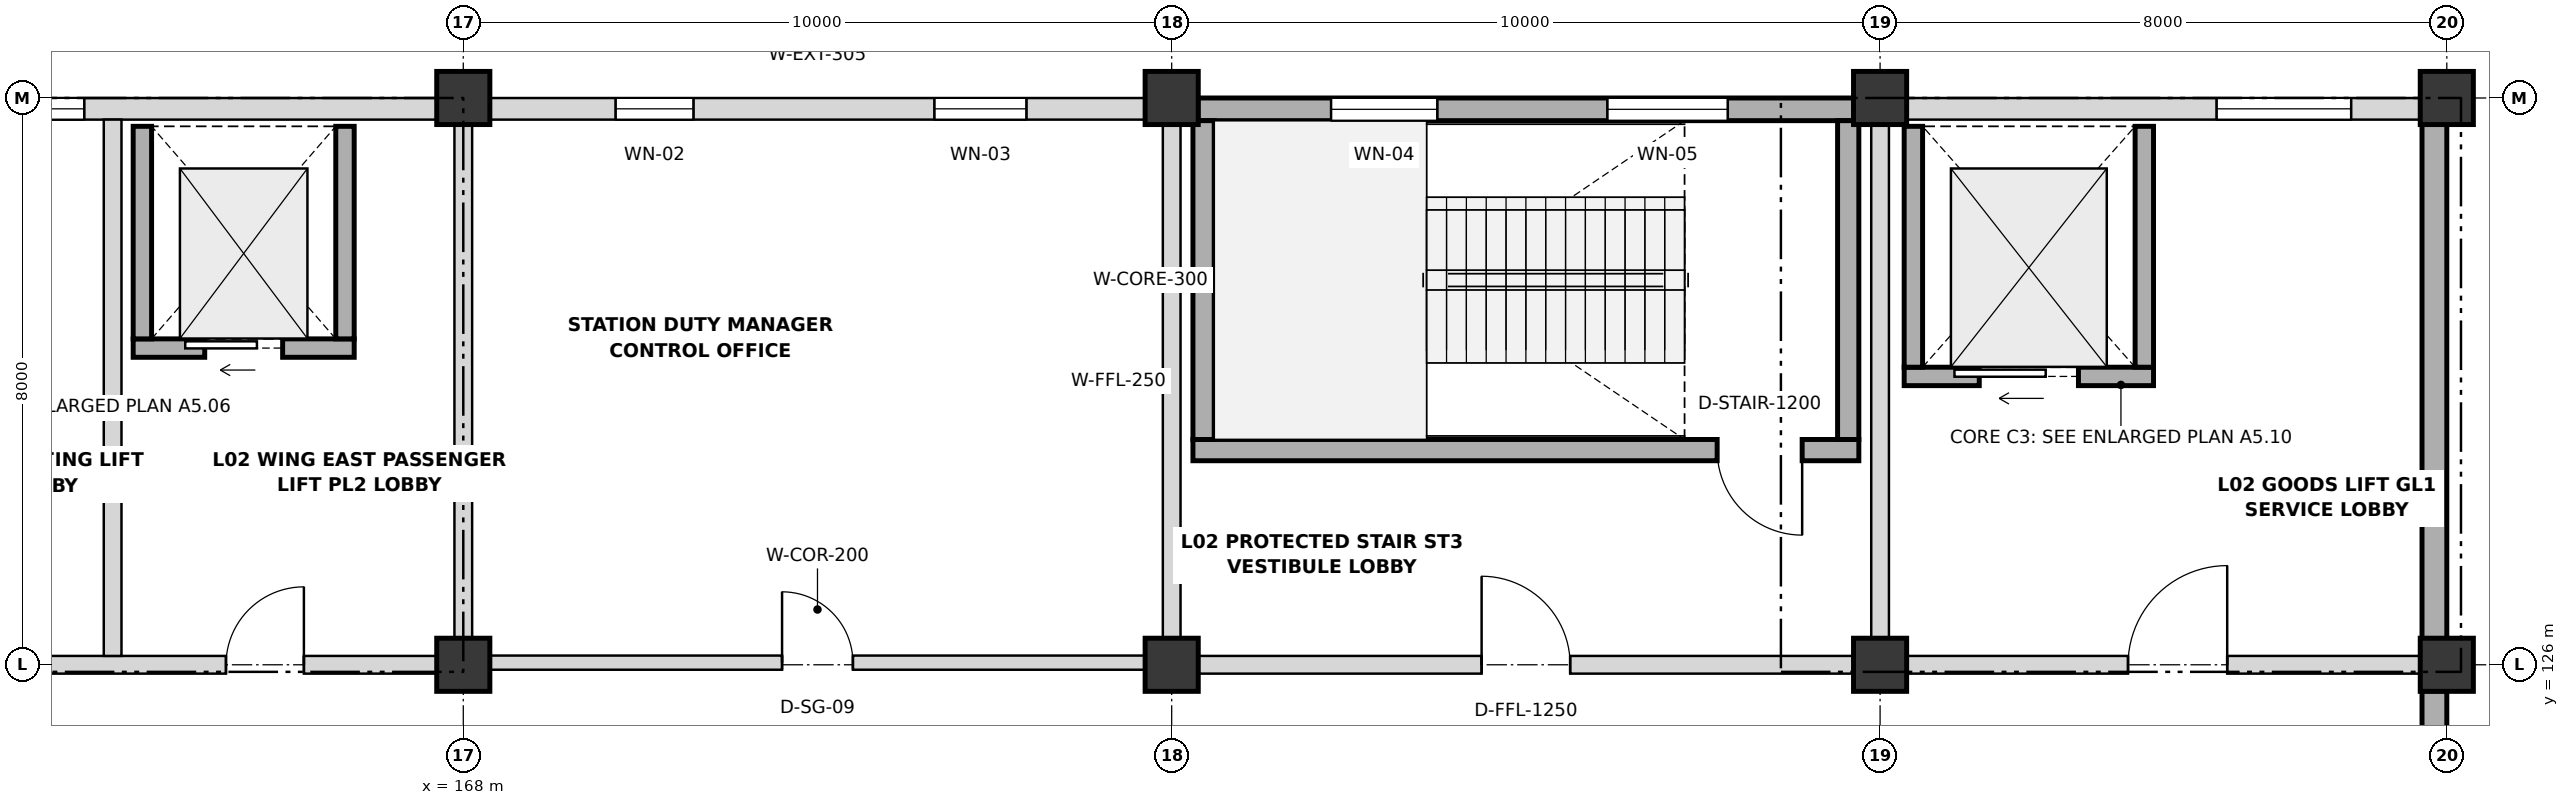
"""IFC4 building model, lengths in metres.
Left out: names, types, materials, properties, quantities, classifications, styles, units other than length and angle.
Written with IfcOpenShell. Run it as: python <this file> out.ifc"""

import sys

from ifc_helpers import new_model, si_unit, direction, frame, frame_2d, origin, origin_2d, place, context, subcontext, project, spatial, rectangle, extrude, element, fill, save


model = new_model("IFC4")
c1 = context("Model", 3, precision=1e-05, world=origin(), true_north=direction((0.0, 1.0)))
c2 = subcontext(c1, "Body", "Model", "MODEL_VIEW")
j1 = project(units=[si_unit("LENGTHUNIT", "METRE"), si_unit("PLANEANGLEUNIT", "RADIAN")], contexts=[c1])
p1 = place(None, origin())
s1 = spatial("IfcSite", under=j1, at=p1, CompositionType="ELEMENT")
p2 = place(p1, origin())
s2 = spatial("IfcBuilding", under=s1, at=p2, CompositionType="ELEMENT")
p3 = place(p2, frame((0.0, 0.0, 9.6)))
s3 = spatial("IfcBuildingStorey", under=s2, at=p3, CompositionType="ELEMENT", Elevation=9.6)
for number, where, z_axis, x_axis in (
    (1, (168.0, 126.0, 0.0), (0.0, 0.0, 1.0), (1.0, 0.0, 0.0)),
    (2, (168.0, 134.0, 0.0), (0.0, 0.0, 1.0), (1.0, 0.0, 0.0)),
    (3, (178.0, 126.0, 0.0), (0.0, 0.0, 1.0), (1.0, 0.0, 0.0)),
    (4, (178.0, 134.0, 0.0), (0.0, 0.0, 1.0), (1.0, 0.0, 0.0)),
    (5, (188.0, 126.0, 0.0), (0.0, 0.0, 1.0), (1.0, 0.0, 0.0)),
    (6, (188.0, 134.0, 0.0), (0.0, 0.0, 1.0), (1.0, 0.0, 0.0)),
    (7, (196.0, 126.0, 0.0), (0.0, 0.0, 1.0), (1.0, 0.0, 0.0)),
    (8, (196.0, 134.0, 0.0), (0.0, 0.0, 1.0), (1.0, 0.0, 0.0)),
):
    element("IfcColumn", number, at=place(p3, frame(where, z_axis=z_axis, x_axis=x_axis)), inside=s3, PredefinedType="COLUMN", context=c2, shape_type="SweptSolid", body=[
        extrude(rectangle(XDim=0.75, YDim=0.75, at=origin_2d()), origin(), (0.0, 0.0, 1.0), 4.8),
    ])
p4 = place(p3, frame((195.825, 125.63, 0.0), z_axis=(0.0, 0.0, 1.0), x_axis=(0.0, -1.0, 0.0)))
e9 = element("IfcWall", 9, at=p4, inside=s3, PredefinedType="SOLIDWALL", context=c2, shape_type="SweptSolid", body=[
    extrude(rectangle(XDim=11.26, YDim=0.35, at=frame_2d((5.63, 0.0))), origin(), (0.0, 0.0, 1.0), 4.8),
])
p5 = place(p3, frame((195.825, 133.63, 0.0), z_axis=(0.0, 0.0, 1.0), x_axis=(0.0, -1.0, 0.0)))
e10 = element("IfcWall", 10, at=p5, inside=s3, PredefinedType="SOLIDWALL", context=c2, shape_type="SweptSolid", body=[
    extrude(rectangle(XDim=7.26, YDim=0.35, at=frame_2d((3.63, 0.0))), origin(), (0.0, 0.0, 1.0), 4.8),
])
p6 = place(p3, frame((158.37, 133.847, 0.0), z_axis=(0.0, 0.0, 1.0), x_axis=(1.0, 0.0, 0.0)))
e11 = element("IfcWall", 11, at=p6, inside=s3, PredefinedType="SOLIDWALL", context=c2, shape_type="SweptSolid", body=[
    extrude(rectangle(XDim=9.26, YDim=0.305, at=frame_2d((4.63, 0.0))), origin(), (0.0, 0.0, 1.0), 3.758),
])
p7 = place(p6, frame((3.38, 0.0, 1.05)))
e12 = element("IfcOpeningElement", 12, at=p7, cuts=e11, PredefinedType="OPENING", context=c2, shape_type="SweptSolid", body=[
    extrude(rectangle(XDim=0.9, YDim=1.15, at=frame_2d((0.45, 0.575))), frame((0.0, 0.162, 0.0), z_axis=(0.0, -1.0, 0.0), x_axis=(1.0, 0.0, 0.0)), (0.0, 0.0, 1.0), 0.325),
])
p8 = place(p3, frame((168.37, 133.847, 0.0), z_axis=(0.0, 0.0, 1.0), x_axis=(1.0, 0.0, 0.0)))
e13 = element("IfcWall", 13, at=p8, inside=s3, PredefinedType="SOLIDWALL", context=c2, shape_type="SweptSolid", body=[
    extrude(rectangle(XDim=9.26, YDim=0.305, at=frame_2d((4.63, 0.0))), origin(), (0.0, 0.0, 1.0), 3.758),
])
p9 = place(p8, frame((1.78, 0.0, 1.05)))
e14 = element("IfcOpeningElement", 14, at=p9, cuts=e13, PredefinedType="OPENING", context=c2, shape_type="SweptSolid", body=[
    extrude(rectangle(XDim=1.1, YDim=1.15, at=frame_2d((0.55, 0.575))), frame((0.0, 0.162, 0.0), z_axis=(0.0, -1.0, 0.0), x_axis=(1.0, 0.0, 0.0)), (0.0, 0.0, 1.0), 0.325),
])
p10 = place(p8, frame((6.28, 0.0, 1.05)))
e15 = element("IfcOpeningElement", 15, at=p10, cuts=e13, PredefinedType="OPENING", context=c2, shape_type="SweptSolid", body=[
    extrude(rectangle(XDim=1.3, YDim=1.15, at=frame_2d((0.65, 0.575))), frame((0.0, 0.162, 0.0), z_axis=(0.0, -1.0, 0.0), x_axis=(1.0, 0.0, 0.0)), (0.0, 0.0, 1.0), 0.325),
])
p11 = place(p3, frame((178.37, 133.84, 0.0), z_axis=(0.0, 0.0, 1.0), x_axis=(1.0, 0.0, 0.0)))
e16 = element("IfcWall", 16, at=p11, inside=s3, PredefinedType="SHEAR", context=c2, shape_type="SweptSolid", body=[
    extrude(rectangle(XDim=9.26, YDim=0.32, at=frame_2d((4.63, 0.0))), origin(), (0.0, 0.0, 1.0), 4.8),
])
p12 = place(p11, frame((1.88, 0.0, 1.05)))
e17 = element("IfcOpeningElement", 17, at=p12, cuts=e16, PredefinedType="OPENING", context=c2, shape_type="SweptSolid", body=[
    extrude(rectangle(XDim=1.5, YDim=1.15, at=frame_2d((0.75, 0.575))), frame((0.0, 0.17, 0.0), z_axis=(0.0, -1.0, 0.0), x_axis=(1.0, 0.0, 0.0)), (0.0, 0.0, 1.0), 0.34),
])
p13 = place(p11, frame((5.78, 0.0, 1.05)))
e18 = element("IfcOpeningElement", 18, at=p13, cuts=e16, PredefinedType="OPENING", context=c2, shape_type="SweptSolid", body=[
    extrude(rectangle(XDim=1.7, YDim=1.15, at=frame_2d((0.85, 0.575))), frame((0.0, 0.17, 0.0), z_axis=(0.0, -1.0, 0.0), x_axis=(1.0, 0.0, 0.0)), (0.0, 0.0, 1.0), 0.34),
])
p14 = place(p3, frame((188.37, 133.847, 0.0), z_axis=(0.0, 0.0, 1.0), x_axis=(1.0, 0.0, 0.0)))
e19 = element("IfcWall", 19, at=p14, inside=s3, PredefinedType="SOLIDWALL", context=c2, shape_type="SweptSolid", body=[
    extrude(rectangle(XDim=7.26, YDim=0.305, at=frame_2d((3.63, 0.0))), origin(), (0.0, 0.0, 1.0), 3.758),
])
p15 = place(p14, frame((4.38, 0.0, 1.05)))
e20 = element("IfcOpeningElement", 20, at=p15, cuts=e19, PredefinedType="OPENING", context=c2, shape_type="SweptSolid", body=[
    extrude(rectangle(XDim=1.9, YDim=1.15, at=frame_2d((0.95, 0.575))), frame((0.0, 0.162, 0.0), z_axis=(0.0, -1.0, 0.0), x_axis=(1.0, 0.0, 0.0)), (0.0, 0.0, 1.0), 0.325),
])
p16 = place(p3, frame((187.7, 129.03, 0.0), z_axis=(0.0, 0.0, 1.0), x_axis=(-1.0, 0.0, 0.0)))
e21 = element("IfcWall", 21, at=p16, inside=s3, PredefinedType="SHEAR", context=c2, shape_type="SweptSolid", body=[
    extrude(rectangle(XDim=9.4, YDim=0.3, at=frame_2d((4.7, 0.0))), origin(), (0.0, 0.0, 1.0), 4.8),
])
p17 = place(p16, frame((0.8, 0.0, 0.0)))
e22 = element("IfcOpeningElement", 22, at=p17, cuts=e21, PredefinedType="OPENING", context=c2, shape_type="SweptSolid", body=[
    extrude(rectangle(XDim=1.2, YDim=2.15, at=frame_2d((0.6, 1.075))), frame((0.0, 0.16, 0.0), z_axis=(0.0, -1.0, 0.0), x_axis=(1.0, 0.0, 0.0)), (0.0, 0.0, 1.0), 0.32),
])
for number, where, z_axis, x_axis in (
    (23, (187.55, 133.68, 0.0), (0.0, 0.0, 1.0), (0.0, -1.0, 0.0)),
    (24, (178.45, 129.18, 0.0), (0.0, 0.0, 1.0), (0.0, 1.0, 0.0)),
):
    element("IfcWall", number, at=place(p3, frame(where, z_axis=z_axis, x_axis=x_axis)), inside=s3, PredefinedType="SHEAR", context=c2, shape_type="SweptSolid", body=[
        extrude(rectangle(XDim=4.5, YDim=0.3, at=frame_2d((2.25, 0.0))), origin(), (0.0, 0.0, 1.0), 4.8),
    ])
p18 = place(p3, frame((163.34, 130.47, 0.0), z_axis=(0.0, 0.0, 1.0), x_axis=(1.0, 0.0, 0.0)))
e25 = element("IfcWall", 25, at=p18, inside=s3, PredefinedType="SHEAR", context=c2, shape_type="SweptSolid", body=[
    extrude(rectangle(XDim=3.12, YDim=0.26, at=frame_2d((1.56, 0.0))), origin(), (0.0, 0.0, 1.0), 4.8),
])
p19 = place(p18, frame((1.01, 0.0, 0.0)))
e26 = element("IfcOpeningElement", 26, at=p19, cuts=e25, PredefinedType="OPENING", context=c2, shape_type="SweptSolid", body=[
    extrude(rectangle(XDim=1.1, YDim=2.15, at=frame_2d((0.55, 1.075))), frame((0.0, 0.14, 0.0), z_axis=(0.0, -1.0, 0.0), x_axis=(1.0, 0.0, 0.0)), (0.0, 0.0, 1.0), 0.28),
])
for number, where, z_axis, x_axis in (
    (27, (163.47, 130.6, 0.0), (0.0, 0.0, 1.0), (0.0, 1.0, 0.0)),
    (28, (166.33, 130.6, 0.0), (0.0, 0.0, 1.0), (0.0, 1.0, 0.0)),
):
    element("IfcWall", number, at=place(p3, frame(where, z_axis=z_axis, x_axis=x_axis)), inside=s3, PredefinedType="SHEAR", context=c2, shape_type="SweptSolid", body=[
        extrude(rectangle(XDim=3.0, YDim=0.26, at=frame_2d((1.5, 0.0))), origin(), (0.0, 0.0, 1.0), 4.8),
    ])
p20 = place(p3, frame((188.34, 130.07, 0.0), z_axis=(0.0, 0.0, 1.0), x_axis=(1.0, 0.0, 0.0)))
e29 = element("IfcWall", 29, at=p20, inside=s3, PredefinedType="SHEAR", context=c2, shape_type="SweptSolid", body=[
    extrude(rectangle(XDim=3.52, YDim=0.26, at=frame_2d((1.76, 0.0))), origin(), (0.0, 0.0, 1.0), 4.8),
])
p21 = place(p20, frame((1.06, 0.0, 0.0)))
e30 = element("IfcOpeningElement", 30, at=p21, cuts=e29, PredefinedType="OPENING", context=c2, shape_type="SweptSolid", body=[
    extrude(rectangle(XDim=1.4, YDim=2.2, at=frame_2d((0.7, 1.1))), frame((0.0, 0.14, 0.0), z_axis=(0.0, -1.0, 0.0), x_axis=(1.0, 0.0, 0.0)), (0.0, 0.0, 1.0), 0.28),
])
for number, where, z_axis, x_axis in (
    (31, (188.47, 130.2, 0.0), (0.0, 0.0, 1.0), (0.0, 1.0, 0.0)),
    (32, (191.73, 130.2, 0.0), (0.0, 0.0, 1.0), (0.0, 1.0, 0.0)),
):
    element("IfcWall", number, at=place(p3, frame(where, z_axis=z_axis, x_axis=x_axis)), inside=s3, PredefinedType="SHEAR", context=c2, shape_type="SweptSolid", body=[
        extrude(rectangle(XDim=3.4, YDim=0.26, at=frame_2d((1.7, 0.0))), origin(), (0.0, 0.0, 1.0), 4.8),
    ])
p22 = place(p3, frame((158.38, 126.0, 0.0), z_axis=(0.0, 0.0, 1.0), x_axis=(1.0, 0.0, 0.0)))
e33 = element("IfcWall", 33, at=p22, inside=s3, PredefinedType="PARTITIONING", context=c2, shape_type="SweptSolid", body=[
    extrude(rectangle(XDim=9.24, YDim=0.25, at=frame_2d((4.62, 0.0))), origin(), (0.0, 0.0, 1.0), 3.658),
])
p23 = place(p22, frame((1.795, 0.0, 0.0)))
e34 = element("IfcOpeningElement", 34, at=p23, cuts=e33, PredefinedType="OPENING", context=c2, shape_type="SweptSolid", body=[
    extrude(rectangle(XDim=1.25, YDim=2.15, at=frame_2d((0.625, 1.075))), frame((0.0, 0.135, 0.0), z_axis=(0.0, -1.0, 0.0), x_axis=(1.0, 0.0, 0.0)), (0.0, 0.0, 1.0), 0.27),
])
p24 = place(p22, frame((6.27, 0.0, 0.0)))
e35 = element("IfcOpeningElement", 35, at=p24, cuts=e33, PredefinedType="OPENING", context=c2, shape_type="SweptSolid", body=[
    extrude(rectangle(XDim=1.1, YDim=2.15, at=frame_2d((0.55, 1.075))), frame((0.0, 0.135, 0.0), z_axis=(0.0, -1.0, 0.0), x_axis=(1.0, 0.0, 0.0)), (0.0, 0.0, 1.0), 0.27),
])
p25 = place(p3, frame((178.38, 126.0, 0.0), z_axis=(0.0, 0.0, 1.0), x_axis=(1.0, 0.0, 0.0)))
e36 = element("IfcWall", 36, at=p25, inside=s3, PredefinedType="PARTITIONING", context=c2, shape_type="SweptSolid", body=[
    extrude(rectangle(XDim=9.24, YDim=0.25, at=frame_2d((4.62, 0.0))), origin(), (0.0, 0.0, 1.0), 3.658),
])
p26 = place(p25, frame((3.995, 0.0, 0.0)))
e37 = element("IfcOpeningElement", 37, at=p26, cuts=e36, PredefinedType="OPENING", context=c2, shape_type="SweptSolid", body=[
    extrude(rectangle(XDim=1.25, YDim=2.15, at=frame_2d((0.625, 1.075))), frame((0.0, 0.135, 0.0), z_axis=(0.0, -1.0, 0.0), x_axis=(1.0, 0.0, 0.0)), (0.0, 0.0, 1.0), 0.27),
])
p27 = place(p3, frame((188.38, 126.0, 0.0), z_axis=(0.0, 0.0, 1.0), x_axis=(1.0, 0.0, 0.0)))
e38 = element("IfcWall", 38, at=p27, inside=s3, PredefinedType="PARTITIONING", context=c2, shape_type="SweptSolid", body=[
    extrude(rectangle(XDim=7.24, YDim=0.25, at=frame_2d((3.62, 0.0))), origin(), (0.0, 0.0, 1.0), 3.658),
])
p28 = place(p27, frame((3.12, 0.0, 0.0)))
e39 = element("IfcOpeningElement", 39, at=p28, cuts=e38, PredefinedType="OPENING", context=c2, shape_type="SweptSolid", body=[
    extrude(rectangle(XDim=1.4, YDim=2.2, at=frame_2d((0.7, 1.1))), frame((0.0, 0.135, 0.0), z_axis=(0.0, -1.0, 0.0), x_axis=(1.0, 0.0, 0.0)), (0.0, 0.0, 1.0), 0.27),
])
p29 = place(p3, frame((163.05, 126.125, 0.0), z_axis=(0.0, 0.0, 1.0), x_axis=(0.0, 1.0, 0.0)))
e40 = element("IfcWall", 40, at=p29, inside=s3, PredefinedType="PARTITIONING", context=c2, shape_type="SweptSolid", body=[
    extrude(rectangle(XDim=7.57, YDim=0.25, at=frame_2d((3.785, 0.0))), origin(), (0.0, 0.0, 1.0), 3.658),
])
for number, where, z_axis, x_axis in (
    (41, (168.0, 126.38, 0.0), (0.0, 0.0, 1.0), (0.0, 1.0, 0.0)),
    (42, (178.0, 126.38, 0.0), (0.0, 0.0, 1.0), (0.0, 1.0, 0.0)),
    (43, (188.0, 126.38, 0.0), (0.0, 0.0, 1.0), (0.0, 1.0, 0.0)),
):
    element("IfcWall", number, at=place(p3, frame(where, z_axis=z_axis, x_axis=x_axis)), inside=s3, PredefinedType="PARTITIONING", context=c2, shape_type="SweptSolid", body=[
        extrude(rectangle(XDim=7.24, YDim=0.25, at=frame_2d((3.62, 0.0))), origin(), (0.0, 0.0, 1.0), 3.758),
    ])
p30 = place(p3, frame((168.3, 126.03, 0.0), z_axis=(0.0, 0.0, 1.0), x_axis=(1.0, 0.0, 0.0)))
e44 = element("IfcWall", 44, at=p30, inside=s3, PredefinedType="PARTITIONING", context=c2, shape_type="SweptSolid", body=[
    extrude(rectangle(XDim=9.4, YDim=0.2, at=frame_2d((4.7, 0.0))), origin(), (0.0, 0.0, 1.0), 3.658),
])
p31 = place(p30, frame((4.2, 0.0, 0.0)))
e45 = element("IfcOpeningElement", 45, at=p31, cuts=e44, PredefinedType="OPENING", context=c2, shape_type="SweptSolid", body=[
    extrude(rectangle(XDim=1.0, YDim=2.2, at=frame_2d((0.5, 1.1))), frame((0.0, 0.11, 0.0), z_axis=(0.0, -1.0, 0.0), x_axis=(1.0, 0.0, 0.0)), (0.0, 0.0, 1.0), 0.22),
])
p32 = place(p7, origin())
e46 = element("IfcWindow", 46, at=p32, inside=s3, PartitioningType="SINGLE_PANEL", PredefinedType="WINDOW", context=c2, shape_type="SweptSolid", body=[
    extrude(rectangle(XDim=0.9, YDim=1.15, at=frame_2d((0.45, 0.575))), frame((0.0, 0.03, 0.0), z_axis=(0.0, -1.0, 0.0), x_axis=(1.0, 0.0, 0.0)), (0.0, 0.0, 1.0), 0.06),
])
fill(e12, e46)
p33 = place(p9, origin())
e47 = element("IfcWindow", 47, at=p33, inside=s3, PartitioningType="SINGLE_PANEL", PredefinedType="WINDOW", context=c2, shape_type="SweptSolid", body=[
    extrude(rectangle(XDim=1.1, YDim=1.15, at=frame_2d((0.55, 0.575))), frame((0.0, 0.03, 0.0), z_axis=(0.0, -1.0, 0.0), x_axis=(1.0, 0.0, 0.0)), (0.0, 0.0, 1.0), 0.06),
])
fill(e14, e47)
p34 = place(p10, origin())
e48 = element("IfcWindow", 48, at=p34, inside=s3, PartitioningType="SINGLE_PANEL", PredefinedType="WINDOW", context=c2, shape_type="SweptSolid", body=[
    extrude(rectangle(XDim=1.3, YDim=1.15, at=frame_2d((0.65, 0.575))), frame((0.0, 0.03, 0.0), z_axis=(0.0, -1.0, 0.0), x_axis=(1.0, 0.0, 0.0)), (0.0, 0.0, 1.0), 0.06),
])
fill(e15, e48)
p35 = place(p12, origin())
e49 = element("IfcWindow", 49, at=p35, inside=s3, PartitioningType="SINGLE_PANEL", PredefinedType="WINDOW", context=c2, shape_type="SweptSolid", body=[
    extrude(rectangle(XDim=1.5, YDim=1.15, at=frame_2d((0.75, 0.575))), frame((0.0, 0.03, 0.0), z_axis=(0.0, -1.0, 0.0), x_axis=(1.0, 0.0, 0.0)), (0.0, 0.0, 1.0), 0.06),
])
fill(e17, e49)
p36 = place(p13, origin())
e50 = element("IfcWindow", 50, at=p36, inside=s3, PartitioningType="SINGLE_PANEL", PredefinedType="WINDOW", context=c2, shape_type="SweptSolid", body=[
    extrude(rectangle(XDim=1.7, YDim=1.15, at=frame_2d((0.85, 0.575))), frame((0.0, 0.03, 0.0), z_axis=(0.0, -1.0, 0.0), x_axis=(1.0, 0.0, 0.0)), (0.0, 0.0, 1.0), 0.06),
])
fill(e18, e50)
p37 = place(p15, origin())
e51 = element("IfcWindow", 51, at=p37, inside=s3, PartitioningType="SINGLE_PANEL", PredefinedType="WINDOW", context=c2, shape_type="SweptSolid", body=[
    extrude(rectangle(XDim=1.9, YDim=1.15, at=frame_2d((0.95, 0.575))), frame((0.0, 0.03, 0.0), z_axis=(0.0, -1.0, 0.0), x_axis=(1.0, 0.0, 0.0)), (0.0, 0.0, 1.0), 0.06),
])
fill(e20, e51)
p38 = place(p17, origin())
e52 = element("IfcDoor", 52, at=p38, inside=s3, OperationType="SINGLE_SWING_LEFT", PredefinedType="DOOR", context=c2, shape_type="SweptSolid", body=[
    extrude(rectangle(XDim=1.2, YDim=2.15, at=frame_2d((0.6, 1.075))), frame((0.0, 0.025, 0.0), z_axis=(0.0, -1.0, 0.0), x_axis=(1.0, 0.0, 0.0)), (0.0, 0.0, 1.0), 0.05),
])
fill(e22, e52)
p39 = place(p19, origin())
e53 = element("IfcDoor", 53, at=p39, inside=s3, OperationType="SLIDING_TO_LEFT", PredefinedType="DOOR", context=c2, shape_type="SweptSolid", body=[
    extrude(rectangle(XDim=1.1, YDim=2.15, at=frame_2d((0.55, 1.075))), frame((0.0, 0.025, 0.0), z_axis=(0.0, -1.0, 0.0), x_axis=(1.0, 0.0, 0.0)), (0.0, 0.0, 1.0), 0.05),
])
fill(e26, e53)
p40 = place(p21, origin())
e54 = element("IfcDoor", 54, at=p40, inside=s3, OperationType="SLIDING_TO_LEFT", PredefinedType="DOOR", context=c2, shape_type="SweptSolid", body=[
    extrude(rectangle(XDim=1.4, YDim=2.2, at=frame_2d((0.7, 1.1))), frame((0.0, 0.025, 0.0), z_axis=(0.0, -1.0, 0.0), x_axis=(1.0, 0.0, 0.0)), (0.0, 0.0, 1.0), 0.05),
])
fill(e30, e54)
p41 = place(p24, origin())
e55 = element("IfcDoor", 55, at=p41, inside=s3, OperationType="SINGLE_SWING_RIGHT", PredefinedType="DOOR", context=c2, shape_type="SweptSolid", body=[
    extrude(rectangle(XDim=1.1, YDim=2.15, at=frame_2d((0.55, 1.075))), frame((0.0, 0.025, 0.0), z_axis=(0.0, -1.0, 0.0), x_axis=(1.0, 0.0, 0.0)), (0.0, 0.0, 1.0), 0.05),
])
fill(e35, e55)
p42 = place(p26, origin())
e56 = element("IfcDoor", 56, at=p42, inside=s3, OperationType="SINGLE_SWING_LEFT", PredefinedType="DOOR", context=c2, shape_type="SweptSolid", body=[
    extrude(rectangle(XDim=1.25, YDim=2.15, at=frame_2d((0.625, 1.075))), frame((0.0, 0.025, 0.0), z_axis=(0.0, -1.0, 0.0), x_axis=(1.0, 0.0, 0.0)), (0.0, 0.0, 1.0), 0.05),
])
fill(e37, e56)
p43 = place(p28, origin())
e57 = element("IfcDoor", 57, at=p43, inside=s3, OperationType="SINGLE_SWING_RIGHT", PredefinedType="DOOR", context=c2, shape_type="SweptSolid", body=[
    extrude(rectangle(XDim=1.4, YDim=2.2, at=frame_2d((0.7, 1.1))), frame((0.0, 0.025, 0.0), z_axis=(0.0, -1.0, 0.0), x_axis=(1.0, 0.0, 0.0)), (0.0, 0.0, 1.0), 0.05),
])
fill(e39, e57)
p44 = place(p31, origin())
e58 = element("IfcDoor", 58, at=p44, inside=s3, OperationType="SINGLE_SWING_LEFT", PredefinedType="DOOR", context=c2, shape_type="SweptSolid", body=[
    extrude(rectangle(XDim=1.0, YDim=2.2, at=frame_2d((0.5, 1.1))), frame((0.0, 0.025, 0.0), z_axis=(0.0, -1.0, 0.0), x_axis=(1.0, 0.0, 0.0)), (0.0, 0.0, 1.0), 0.05),
])
fill(e45, e58)
save(model, sys.argv[1])
